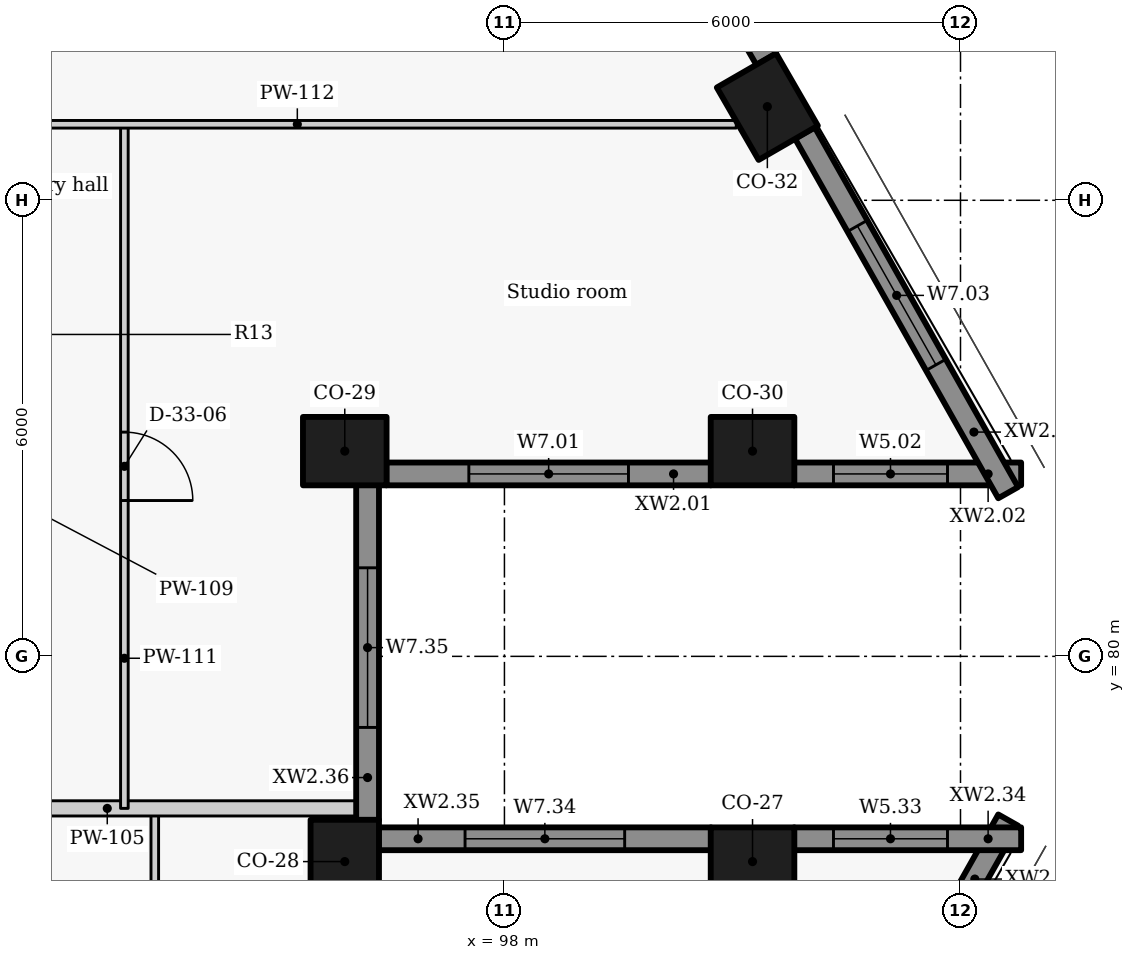
"""IFC4 building model, lengths in metres.
Left out: names, types, materials, properties, quantities, classifications, styles, units other than length and angle.
Written with IfcOpenShell. Run it as: python <this file> out.ifc"""

import sys

from ifc_helpers import new_model, si_unit, direction, frame, frame_2d, origin, origin_2d, place, context, subcontext, project, spatial, rectangle, extrude, element, fill, save


model = new_model("IFC4")
c1 = context("Model", 3, precision=1e-05, world=origin(), true_north=direction((0.0, 1.0)))
c2 = subcontext(c1, "Body", "Model", "MODEL_VIEW")
j1 = project(units=[si_unit("LENGTHUNIT", "METRE"), si_unit("PLANEANGLEUNIT", "RADIAN")], contexts=[c1])
p1 = place(None, origin())
s1 = spatial("IfcSite", under=j1, at=p1, CompositionType="ELEMENT")
p2 = place(p1, origin())
s2 = spatial("IfcBuilding", under=s1, at=p2, CompositionType="ELEMENT")
p3 = place(p2, frame((0.0, 0.0, 239.4)))
s3 = spatial("IfcBuildingStorey", under=s2, at=p3, CompositionType="ELEMENT", Elevation=239.4)
for number, where, z_axis, x_axis in (
    (1, (101.264, 77.3, 0.0), (0.0, 0.0, 1.0), (-1.0, 0.0, 0.0)),
    (2, (95.899, 77.3, 0.0), (0.0, 0.0, 1.0), (0.0, 1.0, 0.0)),
    (3, (95.899, 82.7, 0.0), (0.0, 0.0, 1.0), (1.0, 0.0, 0.0)),
    (4, (101.264, 82.7, 0.0), (0.0, 0.0, 1.0), (1.0, 0.0, 0.0)),
    (5, (101.459, 87.232, 0.0), (0.0, 0.0, 1.0), (-0.5, 0.866, 0.0)),
):
    element("IfcColumn", number, at=place(p3, frame(where, z_axis=z_axis, x_axis=x_axis)), inside=s3, PredefinedType="COLUMN", context=c2, shape_type="SweptSolid", body=[
        extrude(rectangle(XDim=1.1, YDim=0.9, at=origin_2d()), origin(), (0.0, 0.0, 1.0), 3.3),
    ])
p4 = place(p3, frame((96.446, 82.4, 0.0), z_axis=(0.0, 0.0, 1.0), x_axis=(1.0, 0.0, 0.0)))
e6 = element("IfcWall", 6, at=p4, inside=s3, PredefinedType="SOLIDWALL", context=c2, shape_type="SweptSolid", body=[
    extrude(rectangle(XDim=4.272, YDim=0.3, at=frame_2d((2.136, 0.0))), origin(), (0.0, 0.0, 1.0), 2.425),
])
p5 = place(p4, frame((1.086, 0.0, 0.9)))
e7 = element("IfcOpeningElement", 7, at=p5, cuts=e6, PredefinedType="OPENING", context=c2, shape_type="SweptSolid", body=[
    extrude(rectangle(XDim=2.1, YDim=1.1, at=frame_2d((1.05, 0.55))), frame((0.0, 0.16, 0.0), z_axis=(0.0, -1.0, 0.0), x_axis=(1.0, 0.0, 0.0)), (0.0, 0.0, 1.0), 0.32),
])
p6 = place(p3, frame((101.81, 82.4, 0.0), z_axis=(0.0, 0.0, 1.0), x_axis=(1.0, 0.0, 0.0)))
e8 = element("IfcWall", 8, at=p6, inside=s3, PredefinedType="SOLIDWALL", context=c2, shape_type="SweptSolid", body=[
    extrude(rectangle(XDim=2.988, YDim=0.3, at=frame_2d((1.494, 0.0))), origin(), (0.0, 0.0, 1.0), 2.425),
])
p7 = place(p6, frame((0.519, 0.0, 0.9)))
e9 = element("IfcOpeningElement", 9, at=p7, cuts=e8, PredefinedType="OPENING", context=c2, shape_type="SweptSolid", body=[
    extrude(rectangle(XDim=1.5, YDim=1.1, at=frame_2d((0.75, 0.55))), frame((0.0, 0.16, 0.0), z_axis=(0.0, -1.0, 0.0), x_axis=(1.0, 0.0, 0.0)), (0.0, 0.0, 1.0), 0.32),
])
p8 = place(p3, frame((104.627, 82.154, 0.0), z_axis=(0.0, 0.0, 1.0), x_axis=(-0.492080931903, 0.870549456641, 0.0)))
e10 = element("IfcWall", 10, at=p8, inside=s3, PredefinedType="SOLIDWALL", context=c2, shape_type="SweptSolid", body=[
    extrude(rectangle(XDim=5.437, YDim=0.3, at=frame_2d((2.718, 0.0))), origin(), (0.0, 0.0, 1.0), 2.425),
])
p9 = place(p8, frame((1.931, 0.0, 0.9)))
e11 = element("IfcOpeningElement", 11, at=p9, cuts=e10, PredefinedType="OPENING", context=c2, shape_type="SweptSolid", body=[
    extrude(rectangle(XDim=2.1, YDim=1.1, at=frame_2d((1.05, 0.55))), frame((0.0, 0.16, 0.0), z_axis=(0.0, -1.0, 0.0), x_axis=(1.0, 0.0, 0.0)), (0.0, 0.0, 1.0), 0.32),
])
p10 = place(p3, frame((101.446, 87.855, 0.0), z_axis=(0.0, 0.0, 1.0), x_axis=(-0.500010404316, 0.866019396766, 0.0)))
e12 = element("IfcWall", 12, at=p10, inside=s3, PredefinedType="SOLIDWALL", context=c2, shape_type="SweptSolid", body=[
    extrude(rectangle(XDim=3.547, YDim=0.3, at=frame_2d((1.774, 0.0))), origin(), (0.0, 0.0, 1.0), 2.425),
])
p11 = place(p10, frame((0.723, 0.0, 0.9)))
e13 = element("IfcOpeningElement", 13, at=p11, cuts=e12, PredefinedType="OPENING", context=c2, shape_type="SweptSolid", body=[
    extrude(rectangle(XDim=2.1, YDim=1.1, at=frame_2d((1.05, 0.55))), frame((0.0, 0.16, 0.0), z_axis=(0.0, -1.0, 0.0), x_axis=(1.0, 0.0, 0.0)), (0.0, 0.0, 1.0), 0.32),
])
p12 = place(p3, frame((101.952, 73.114, 0.0), z_axis=(0.0, 0.0, 1.0), x_axis=(0.492080931903, 0.870549456641, 0.0)))
e14 = element("IfcWall", 14, at=p12, inside=s3, PredefinedType="SOLIDWALL", context=c2, shape_type="SweptSolid", body=[
    extrude(rectangle(XDim=5.437, YDim=0.3, at=frame_2d((2.718, 0.0))), origin(), (0.0, 0.0, 1.0), 2.425),
])
p13 = place(p12, frame((1.453, 0.0, 0.9)))
e15 = element("IfcOpeningElement", 15, at=p13, cuts=e14, PredefinedType="OPENING", context=c2, shape_type="SweptSolid", body=[
    extrude(rectangle(XDim=2.1, YDim=1.1, at=frame_2d((1.05, 0.55))), frame((0.0, 0.16, 0.0), z_axis=(0.0, -1.0, 0.0), x_axis=(1.0, 0.0, 0.0)), (0.0, 0.0, 1.0), 0.32),
])
p14 = place(p3, frame((104.798, 77.6, 0.0), z_axis=(0.0, 0.0, 1.0), x_axis=(-1.0, 0.0, 0.0)))
e16 = element("IfcWall", 16, at=p14, inside=s3, PredefinedType="SOLIDWALL", context=c2, shape_type="SweptSolid", body=[
    extrude(rectangle(XDim=2.988, YDim=0.3, at=frame_2d((1.494, 0.0))), origin(), (0.0, 0.0, 1.0), 2.425),
])
p15 = place(p14, frame((0.969, 0.0, 0.9)))
e17 = element("IfcOpeningElement", 17, at=p15, cuts=e16, PredefinedType="OPENING", context=c2, shape_type="SweptSolid", body=[
    extrude(rectangle(XDim=1.5, YDim=1.1, at=frame_2d((0.75, 0.55))), frame((0.0, 0.16, 0.0), z_axis=(0.0, -1.0, 0.0), x_axis=(1.0, 0.0, 0.0)), (0.0, 0.0, 1.0), 0.32),
])
p16 = place(p3, frame((100.718, 77.6, 0.0), z_axis=(0.0, 0.0, 1.0), x_axis=(-1.0, 0.0, 0.0)))
e18 = element("IfcWall", 18, at=p16, inside=s3, PredefinedType="SOLIDWALL", context=c2, shape_type="SweptSolid", body=[
    extrude(rectangle(XDim=4.373, YDim=0.3, at=frame_2d((2.186, 0.0))), origin(), (0.0, 0.0, 1.0), 2.425),
])
p17 = place(p16, frame((1.136, 0.0, 0.9)))
e19 = element("IfcOpeningElement", 19, at=p17, cuts=e18, PredefinedType="OPENING", context=c2, shape_type="SweptSolid", body=[
    extrude(rectangle(XDim=2.1, YDim=1.1, at=frame_2d((1.05, 0.55))), frame((0.0, 0.16, 0.0), z_axis=(0.0, -1.0, 0.0), x_axis=(1.0, 0.0, 0.0)), (0.0, 0.0, 1.0), 0.32),
])
p18 = place(p3, frame((96.199, 77.846, 0.0), z_axis=(0.0, 0.0, 1.0), x_axis=(0.0, 1.0, 0.0)))
e20 = element("IfcWall", 20, at=p18, inside=s3, PredefinedType="SOLIDWALL", context=c2, shape_type="SweptSolid", body=[
    extrude(rectangle(XDim=4.408, YDim=0.3, at=frame_2d((2.204, 0.0))), origin(), (0.0, 0.0, 1.0), 2.425),
])
p19 = place(p18, frame((1.219, 0.0, 0.9)))
e21 = element("IfcOpeningElement", 21, at=p19, cuts=e20, PredefinedType="OPENING", context=c2, shape_type="SweptSolid", body=[
    extrude(rectangle(XDim=2.1, YDim=1.1, at=frame_2d((1.05, 0.55))), frame((0.0, 0.16, 0.0), z_axis=(0.0, -1.0, 0.0), x_axis=(1.0, 0.0, 0.0)), (0.0, 0.0, 1.0), 0.32),
])
p20 = place(p3, frame((93.4, 78.0, 0.0), z_axis=(0.0, 0.0, 1.0), x_axis=(0.0, -1.0, 0.0)))
e22 = element("IfcWall", 22, at=p20, inside=s3, PredefinedType="PARTITIONING", context=c2, shape_type="SweptSolid", body=[
    extrude(rectangle(XDim=11.2, YDim=0.1, at=frame_2d((5.6, 0.0))), origin(), (0.0, 0.0, 1.0), 3.025),
])
p21 = place(p20, frame((9.124, 0.0, 0.0)))
e23 = element("IfcOpeningElement", 23, at=p21, cuts=e22, PredefinedType="OPENING", context=c2, shape_type="SweptSolid", body=[
    extrude(rectangle(XDim=0.9, YDim=2.1, at=frame_2d((0.45, 1.05))), frame((0.0, 0.06, 0.0), z_axis=(0.0, -1.0, 0.0), x_axis=(1.0, 0.0, 0.0)), (0.0, 0.0, 1.0), 0.12),
])
p22 = place(p20, frame((5.873, 0.0, 0.0)))
e24 = element("IfcOpeningElement", 24, at=p22, cuts=e22, PredefinedType="OPENING", context=c2, shape_type="SweptSolid", body=[
    extrude(rectangle(XDim=0.9, YDim=2.1, at=frame_2d((0.45, 1.05))), frame((0.0, 0.06, 0.0), z_axis=(0.0, -1.0, 0.0), x_axis=(1.0, 0.0, 0.0)), (0.0, 0.0, 1.0), 0.12),
])
p23 = place(p20, frame((1.898, 0.0, 0.0)))
e25 = element("IfcOpeningElement", 25, at=p23, cuts=e22, PredefinedType="OPENING", context=c2, shape_type="SweptSolid", body=[
    extrude(rectangle(XDim=0.9, YDim=2.1, at=frame_2d((0.45, 1.05))), frame((0.0, 0.06, 0.0), z_axis=(0.0, -1.0, 0.0), x_axis=(1.0, 0.0, 0.0)), (0.0, 0.0, 1.0), 0.12),
])
p24 = place(p3, frame((89.5, 78.0, 0.0), z_axis=(0.0, 0.0, 1.0), x_axis=(1.0, 0.0, 0.0)))
e26 = element("IfcWall", 26, at=p24, inside=s3, PredefinedType="PARTITIONING", context=c2, shape_type="SweptSolid", body=[
    extrude(rectangle(XDim=6.55, YDim=0.2, at=frame_2d((3.275, 0.0))), origin(), (0.0, 0.0, 1.0), 2.405),
])
p25 = place(p3, frame((93.0, 87.0, 0.0), z_axis=(0.0, 0.0, 1.0), x_axis=(0.0, -1.0, 0.0)))
e27 = element("IfcWall", 27, at=p25, inside=s3, PredefinedType="PARTITIONING", context=c2, shape_type="SweptSolid", body=[
    extrude(rectangle(XDim=9.0, YDim=0.1, at=frame_2d((4.5, 0.0))), origin(), (0.0, 0.0, 1.0), 3.025),
])
p26 = place(p25, frame((4.05, 0.0, 0.0)))
e28 = element("IfcOpeningElement", 28, at=p26, cuts=e27, PredefinedType="OPENING", context=c2, shape_type="SweptSolid", body=[
    extrude(rectangle(XDim=0.9, YDim=2.1, at=frame_2d((0.45, 1.05))), frame((0.0, 0.06, 0.0), z_axis=(0.0, -1.0, 0.0), x_axis=(1.0, 0.0, 0.0)), (0.0, 0.0, 1.0), 0.12),
])
p27 = place(p3, frame((89.5, 87.0, 0.0), z_axis=(0.0, 0.0, 1.0), x_axis=(1.0, 0.0, 0.0)))
e29 = element("IfcWall", 29, at=p27, inside=s3, PredefinedType="PARTITIONING", context=c2, shape_type="SweptSolid", body=[
    extrude(rectangle(XDim=11.55, YDim=0.1, at=frame_2d((5.775, 0.0))), origin(), (0.0, 0.0, 1.0), 2.505),
])
p28 = place(p5, origin())
e30 = element("IfcWindow", 30, at=p28, inside=s3, PartitioningType="SINGLE_PANEL", PredefinedType="WINDOW", context=c2, shape_type="SweptSolid", body=[
    extrude(rectangle(XDim=2.1, YDim=1.1, at=frame_2d((1.05, 0.55))), frame((0.0, 0.03, 0.0), z_axis=(0.0, -1.0, 0.0), x_axis=(1.0, 0.0, 0.0)), (0.0, 0.0, 1.0), 0.06),
])
fill(e7, e30)
p29 = place(p7, origin())
e31 = element("IfcWindow", 31, at=p29, inside=s3, PartitioningType="SINGLE_PANEL", PredefinedType="WINDOW", context=c2, shape_type="SweptSolid", body=[
    extrude(rectangle(XDim=1.5, YDim=1.1, at=frame_2d((0.75, 0.55))), frame((0.0, 0.03, 0.0), z_axis=(0.0, -1.0, 0.0), x_axis=(1.0, 0.0, 0.0)), (0.0, 0.0, 1.0), 0.06),
])
fill(e9, e31)
p30 = place(p9, origin())
e32 = element("IfcWindow", 32, at=p30, inside=s3, PartitioningType="SINGLE_PANEL", PredefinedType="WINDOW", context=c2, shape_type="SweptSolid", body=[
    extrude(rectangle(XDim=2.1, YDim=1.1, at=frame_2d((1.05, 0.55))), frame((0.0, 0.03, 0.0), z_axis=(0.0, -1.0, 0.0), x_axis=(1.0, 0.0, 0.0)), (0.0, 0.0, 1.0), 0.06),
])
fill(e11, e32)
p31 = place(p15, origin())
e33 = element("IfcWindow", 33, at=p31, inside=s3, PartitioningType="SINGLE_PANEL", PredefinedType="WINDOW", context=c2, shape_type="SweptSolid", body=[
    extrude(rectangle(XDim=1.5, YDim=1.1, at=frame_2d((0.75, 0.55))), frame((0.0, 0.03, 0.0), z_axis=(0.0, -1.0, 0.0), x_axis=(1.0, 0.0, 0.0)), (0.0, 0.0, 1.0), 0.06),
])
fill(e17, e33)
p32 = place(p17, origin())
e34 = element("IfcWindow", 34, at=p32, inside=s3, PartitioningType="SINGLE_PANEL", PredefinedType="WINDOW", context=c2, shape_type="SweptSolid", body=[
    extrude(rectangle(XDim=2.1, YDim=1.1, at=frame_2d((1.05, 0.55))), frame((0.0, 0.03, 0.0), z_axis=(0.0, -1.0, 0.0), x_axis=(1.0, 0.0, 0.0)), (0.0, 0.0, 1.0), 0.06),
])
fill(e19, e34)
p33 = place(p19, origin())
e35 = element("IfcWindow", 35, at=p33, inside=s3, PartitioningType="SINGLE_PANEL", PredefinedType="WINDOW", context=c2, shape_type="SweptSolid", body=[
    extrude(rectangle(XDim=2.1, YDim=1.1, at=frame_2d((1.05, 0.55))), frame((0.0, 0.03, 0.0), z_axis=(0.0, -1.0, 0.0), x_axis=(1.0, 0.0, 0.0)), (0.0, 0.0, 1.0), 0.06),
])
fill(e21, e35)
p34 = place(p26, origin())
e36 = element("IfcDoor", 36, at=p34, inside=s3, OperationType="SINGLE_SWING_RIGHT", PredefinedType="DOOR", context=c2, shape_type="SweptSolid", body=[
    extrude(rectangle(XDim=0.9, YDim=2.1, at=frame_2d((0.45, 1.05))), frame((0.0, 0.025, 0.0), z_axis=(0.0, -1.0, 0.0), x_axis=(1.0, 0.0, 0.0)), (0.0, 0.0, 1.0), 0.05),
])
fill(e28, e36)
save(model, sys.argv[1])
